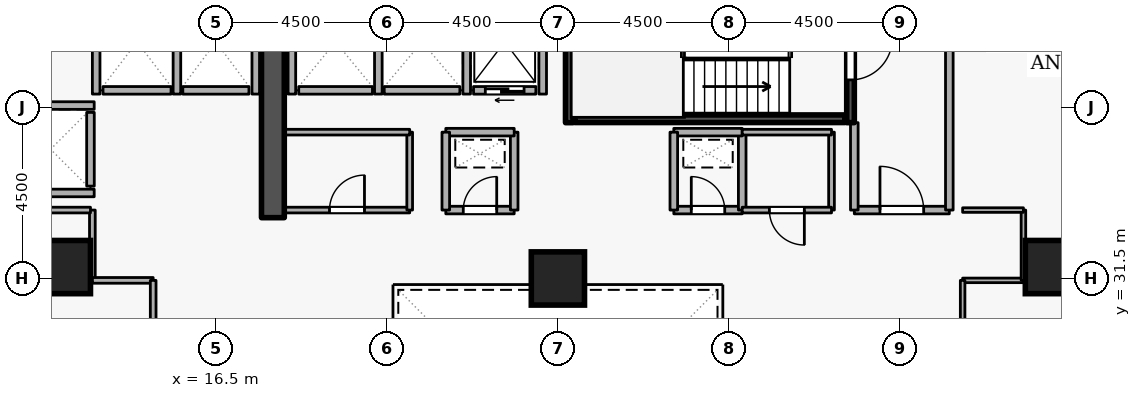
"""IFC4 building model, lengths in metres.
Left out: names, types, materials, properties, quantities, classifications, styles, units other than length and angle.
Written with IfcOpenShell. Run it as: python <this file> out.ifc"""

import sys

from ifc_helpers import new_model, si_unit, direction, frame, frame_2d, origin, origin_2d, place, context, subcontext, project, spatial, rectangle, extrude, element, fill, save


model = new_model("IFC4")
c1 = context("Model", 3, precision=1e-05, world=origin(), true_north=direction((0.0, 1.0)))
c2 = subcontext(c1, "Body", "Model", "MODEL_VIEW")
j1 = project(units=[si_unit("LENGTHUNIT", "METRE"), si_unit("PLANEANGLEUNIT", "RADIAN")], contexts=[c1])
p1 = place(None, origin())
s1 = spatial("IfcSite", under=j1, at=p1, CompositionType="ELEMENT")
p2 = place(p1, origin())
s2 = spatial("IfcBuilding", under=s1, at=p2, CompositionType="ELEMENT")
p3 = place(p2, frame((0.0, 0.0, 27.9)))
s3 = spatial("IfcBuildingStorey", under=s2, at=p3, CompositionType="ELEMENT", Elevation=27.9)
p4 = place(p3, frame((18.0, 33.1, 0.0), z_axis=(0.0, 0.0, 1.0), x_axis=(0.0, 1.0, 0.0)))
e1 = element("IfcWall", 1, at=p4, inside=s3, PredefinedType="SHEAR", context=c2, shape_type="SweptSolid", body=[
    extrude(rectangle(XDim=5.7, YDim=0.6, at=frame_2d((2.85, 0.0))), origin(), (0.0, 0.0, 1.0), 3.6),
])
for number, where, z_axis, x_axis in (
    (2, (12.5, 31.8, 0.0), (0.0, 0.0, 1.0), (1.0, 0.0, 0.0)),
    (3, (38.5, 31.8, 0.0), (0.0, 0.0, 1.0), (1.0, 0.0, 0.0)),
    (4, (25.5, 31.5, 0.0), (0.0, 0.0, 1.0), (1.0, 0.0, 0.0)),
):
    element("IfcColumn", number, at=place(p3, frame(where, z_axis=z_axis, x_axis=x_axis)), inside=s3, PredefinedType="COLUMN", context=c2, shape_type="SweptSolid", body=[
        extrude(rectangle(XDim=1.4, YDim=1.4, at=origin_2d()), origin(), (0.0, 0.0, 1.0), 3.6),
    ])
p5 = place(p3, frame((24.92, 36.45, 0.0), z_axis=(0.0, 0.0, 1.0), x_axis=(-1.0, 0.0, 0.0)))
e5 = element("IfcWall", 5, at=p5, inside=s3, PredefinedType="STANDARD", context=c2, shape_type="SweptSolid", body=[
    extrude(rectangle(XDim=1.64, YDim=0.2, at=frame_2d((0.82, 0.0))), origin(), (0.0, 0.0, 1.0), 3.34),
])
p6 = place(p5, frame((0.31, 0.0, 0.0)))
e6 = element("IfcOpeningElement", 6, at=p6, cuts=e5, PredefinedType="OPENING", context=c2, shape_type="SweptSolid", body=[
    extrude(rectangle(XDim=1.02, YDim=2.06, at=frame_2d((0.51, 1.03))), frame((0.0, 0.11, 0.0), z_axis=(0.0, -1.0, 0.0), x_axis=(1.0, 0.0, 0.0)), (0.0, 0.0, 1.0), 0.22),
])
p7 = place(p3, frame((22.92, 36.45, 0.0), z_axis=(0.0, 0.0, 1.0), x_axis=(-1.0, 0.0, 0.0)))
e7 = element("IfcWall", 7, at=p7, inside=s3, PredefinedType="STANDARD", context=c2, shape_type="SweptSolid", body=[
    extrude(rectangle(XDim=1.99, YDim=0.2, at=frame_2d((0.995, 0.0))), origin(), (0.0, 0.0, 1.0), 3.34),
])
p8 = place(p3, frame((20.62, 36.45, 0.0), z_axis=(0.0, 0.0, 1.0), x_axis=(-1.0, 0.0, 0.0)))
e8 = element("IfcWall", 8, at=p8, inside=s3, PredefinedType="STANDARD", context=c2, shape_type="SweptSolid", body=[
    extrude(rectangle(XDim=1.94, YDim=0.2, at=frame_2d((0.97, 0.0))), origin(), (0.0, 0.0, 1.0), 3.34),
])
p9 = place(p3, frame((17.37, 36.45, 0.0), z_axis=(0.0, 0.0, 1.0), x_axis=(-1.0, 0.0, 0.0)))
e9 = element("IfcWall", 9, at=p9, inside=s3, PredefinedType="STANDARD", context=c2, shape_type="SweptSolid", body=[
    extrude(rectangle(XDim=1.74, YDim=0.2, at=frame_2d((0.87, 0.0))), origin(), (0.0, 0.0, 1.0), 3.34),
])
p10 = place(p3, frame((15.32, 36.45, 0.0), z_axis=(0.0, 0.0, 1.0), x_axis=(-1.0, 0.0, 0.0)))
e10 = element("IfcWall", 10, at=p10, inside=s3, PredefinedType="STANDARD", context=c2, shape_type="SweptSolid", body=[
    extrude(rectangle(XDim=1.79, YDim=0.2, at=frame_2d((0.895, 0.0))), origin(), (0.0, 0.0, 1.0), 3.34),
])
p11 = place(p3, frame((13.2, 33.93, 0.0), z_axis=(0.0, 0.0, 1.0), x_axis=(0.0, 1.0, 0.0)))
e11 = element("IfcWall", 11, at=p11, inside=s3, PredefinedType="STANDARD", context=c2, shape_type="SweptSolid", body=[
    extrude(rectangle(XDim=1.94, YDim=0.2, at=frame_2d((0.97, 0.0))), origin(), (0.0, 0.0, 1.0), 3.34),
])
for number, where, z_axis, x_axis in (
    (12, (25.1, 36.352, 0.0), (0.0, 0.0, 1.0), (0.0, 1.0, 0.0)),
    (13, (23.1, 36.352, 0.0), (0.0, 0.0, 1.0), (0.0, 1.0, 0.0)),
    (14, (20.775, 36.352, 0.0), (0.0, 0.0, 1.0), (0.0, 1.0, 0.0)),
    (15, (18.5, 36.352, 0.0), (0.0, 0.0, 1.0), (0.0, 1.0, 0.0)),
):
    element("IfcWall", number, at=place(p3, frame(where, z_axis=z_axis, x_axis=x_axis)), inside=s3, PredefinedType="STANDARD", context=c2, shape_type="SweptSolid", body=[
        extrude(rectangle(XDim=2.436, YDim=0.2, at=frame_2d((1.218, 0.0))), origin(), (0.0, 0.0, 1.0), 3.34),
    ])
p12 = place(p3, frame((17.55, 36.352, 0.0), z_axis=(0.0, 0.0, 1.0), x_axis=(0.0, 1.0, 0.0)))
e16 = element("IfcWall", 16, at=p12, inside=s3, PredefinedType="STANDARD", context=c2, shape_type="SweptSolid", body=[
    extrude(rectangle(XDim=2.636, YDim=0.2, at=frame_2d((1.318, 0.0))), origin(), (0.0, 0.0, 1.0), 2.545),
])
for number, where, z_axis, x_axis in (
    (17, (15.475, 36.352, 0.0), (0.0, 0.0, 1.0), (0.0, 1.0, 0.0)),
    (18, (13.35, 36.352, 0.0), (0.0, 0.0, 1.0), (0.0, 1.0, 0.0)),
):
    element("IfcWall", number, at=place(p3, frame(where, z_axis=z_axis, x_axis=x_axis)), inside=s3, PredefinedType="STANDARD", context=c2, shape_type="SweptSolid", body=[
        extrude(rectangle(XDim=2.636, YDim=0.2, at=frame_2d((1.318, 0.0))), origin(), (0.0, 0.0, 1.0), 3.34),
    ])
for number, where, z_axis, x_axis in (
    (19, (11.002, 36.05, 0.0), (0.0, 0.0, 1.0), (1.0, 0.0, 0.0)),
    (20, (11.002, 33.75, 0.0), (0.0, 0.0, 1.0), (1.0, 0.0, 0.0)),
):
    element("IfcWall", number, at=place(p3, frame(where, z_axis=z_axis, x_axis=x_axis)), inside=s3, PredefinedType="STANDARD", context=c2, shape_type="SweptSolid", body=[
        extrude(rectangle(XDim=2.296, YDim=0.2, at=frame_2d((1.148, 0.0))), origin(), (0.0, 0.0, 1.0), 3.34),
    ])
p13 = place(p3, frame((33.2, 38.95, 0.0), z_axis=(0.0, 0.0, 1.0), x_axis=(0.0, -1.0, 0.0)))
e21 = element("IfcWall", 21, at=p13, inside=s3, PredefinedType="SHEAR", context=c2, shape_type="SweptSolid", body=[
    extrude(rectangle(XDim=3.35, YDim=0.2, at=frame_2d((1.675, 0.0))), origin(), (0.0, 0.0, 1.0), 3.6),
])
p14 = place(p13, frame((1.125, 0.0, 0.0)))
e22 = element("IfcOpeningElement", 22, at=p14, cuts=e21, PredefinedType="OPENING", context=c2, shape_type="SweptSolid", body=[
    extrude(rectangle(XDim=1.1, YDim=2.1, at=frame_2d((0.55, 1.05))), frame((0.0, 0.11, 0.0), z_axis=(0.0, -1.0, 0.0), x_axis=(1.0, 0.0, 0.0)), (0.0, 0.0, 1.0), 0.22),
])
p15 = place(p3, frame((25.8, 35.6, 0.0), z_axis=(0.0, 0.0, 1.0), x_axis=(0.0, 1.0, 0.0)))
e23 = element("IfcWall", 23, at=p15, inside=s3, PredefinedType="SHEAR", context=c2, shape_type="SweptSolid", body=[
    extrude(rectangle(XDim=3.35, YDim=0.2, at=frame_2d((1.675, 0.0))), origin(), (0.0, 0.0, 1.0), 3.6),
])
p16 = place(p3, frame((25.95, 35.703, 0.0), z_axis=(0.0, 0.0, 1.0), x_axis=(1.0, 0.0, 0.0)))
e24 = element("IfcWall", 24, at=p16, inside=s3, PredefinedType="SHEAR", context=c2, shape_type="SweptSolid", body=[
    extrude(rectangle(XDim=7.1, YDim=0.2, at=frame_2d((3.55, 0.0))), origin(), (0.0, 0.0, 1.0), 3.6),
])
p17 = place(p3, frame((33.3, 33.3, 0.0), z_axis=(0.0, 0.0, 1.0), x_axis=(1.0, 0.0, 0.0)))
e25 = element("IfcWall", 25, at=p17, inside=s3, PredefinedType="STANDARD", context=c2, shape_type="SweptSolid", body=[
    extrude(rectangle(XDim=2.5, YDim=0.2, at=frame_2d((1.25, 0.0))), origin(), (0.0, 0.0, 1.0), 3.34),
])
p18 = place(p17, frame((0.675, 0.0, 0.0)))
e26 = element("IfcOpeningElement", 26, at=p18, cuts=e25, PredefinedType="OPENING", context=c2, shape_type="SweptSolid", body=[
    extrude(rectangle(XDim=1.15, YDim=2.1, at=frame_2d((0.575, 1.05))), frame((0.0, 0.11, 0.0), z_axis=(0.0, -1.0, 0.0), x_axis=(1.0, 0.0, 0.0)), (0.0, 0.0, 1.0), 0.22),
])
p19 = place(p3, frame((35.8, 33.3, 0.0), z_axis=(0.0, 0.0, 1.0), x_axis=(0.0, 1.0, 0.0)))
e27 = element("IfcWall", 27, at=p19, inside=s3, PredefinedType="STANDARD", context=c2, shape_type="SweptSolid", body=[
    extrude(rectangle(XDim=5.7, YDim=0.2, at=frame_2d((2.85, 0.0))), origin(), (0.0, 0.0, 1.0), 3.34),
])
p20 = place(p3, frame((33.3, 35.6, 0.0), z_axis=(0.0, 0.0, 1.0), x_axis=(0.0, -1.0, 0.0)))
e28 = element("IfcWall", 28, at=p20, inside=s3, PredefinedType="STANDARD", context=c2, shape_type="SweptSolid", body=[
    extrude(rectangle(XDim=2.3, YDim=0.2, at=frame_2d((1.15, 0.0))), origin(), (0.0, 0.0, 1.0), 2.545),
])
p21 = place(p3, frame((22.55, 33.3, 0.0), z_axis=(0.0, 0.0, 1.0), x_axis=(1.0, 0.0, 0.0)))
e29 = element("IfcWall", 29, at=p21, inside=s3, PredefinedType="STANDARD", context=c2, shape_type="SweptSolid", body=[
    extrude(rectangle(XDim=1.8, YDim=0.2, at=frame_2d((0.9, 0.0))), origin(), (0.0, 0.0, 1.0), 3.34),
])
p22 = place(p21, frame((0.46, 0.0, 0.0)))
e30 = element("IfcOpeningElement", 30, at=p22, cuts=e29, PredefinedType="OPENING", context=c2, shape_type="SweptSolid", body=[
    extrude(rectangle(XDim=0.88, YDim=2.04, at=frame_2d((0.44, 1.02))), frame((0.0, 0.11, 0.0), z_axis=(0.0, -1.0, 0.0), x_axis=(1.0, 0.0, 0.0)), (0.0, 0.0, 1.0), 0.22),
])
p23 = place(p3, frame((24.35, 33.3, 0.0), z_axis=(0.0, 0.0, 1.0), x_axis=(0.0, 1.0, 0.0)))
e31 = element("IfcWall", 31, at=p23, inside=s3, PredefinedType="STANDARD", context=c2, shape_type="SweptSolid", body=[
    extrude(rectangle(XDim=2.05, YDim=0.2, at=frame_2d((1.025, 0.0))), origin(), (0.0, 0.0, 1.0), 3.34),
])
p24 = place(p3, frame((24.35, 35.35, 0.0), z_axis=(0.0, 0.0, 1.0), x_axis=(-1.0, 0.0, 0.0)))
e32 = element("IfcWall", 32, at=p24, inside=s3, PredefinedType="STANDARD", context=c2, shape_type="SweptSolid", body=[
    extrude(rectangle(XDim=1.8, YDim=0.2, at=frame_2d((0.9, 0.0))), origin(), (0.0, 0.0, 1.0), 3.34),
])
p25 = place(p3, frame((22.55, 35.35, 0.0), z_axis=(0.0, 0.0, 1.0), x_axis=(0.0, -1.0, 0.0)))
e33 = element("IfcWall", 33, at=p25, inside=s3, PredefinedType="STANDARD", context=c2, shape_type="SweptSolid", body=[
    extrude(rectangle(XDim=2.05, YDim=0.2, at=frame_2d((1.025, 0.0))), origin(), (0.0, 0.0, 1.0), 3.34),
])
p26 = place(p3, frame((28.55, 33.3, 0.0), z_axis=(0.0, 0.0, 1.0), x_axis=(1.0, 0.0, 0.0)))
e34 = element("IfcWall", 34, at=p26, inside=s3, PredefinedType="STANDARD", context=c2, shape_type="SweptSolid", body=[
    extrude(rectangle(XDim=1.8, YDim=0.2, at=frame_2d((0.9, 0.0))), origin(), (0.0, 0.0, 1.0), 3.34),
])
p27 = place(p26, frame((0.46, 0.0, 0.0)))
e35 = element("IfcOpeningElement", 35, at=p27, cuts=e34, PredefinedType="OPENING", context=c2, shape_type="SweptSolid", body=[
    extrude(rectangle(XDim=0.88, YDim=2.04, at=frame_2d((0.44, 1.02))), frame((0.0, 0.11, 0.0), z_axis=(0.0, -1.0, 0.0), x_axis=(1.0, 0.0, 0.0)), (0.0, 0.0, 1.0), 0.22),
])
p28 = place(p3, frame((30.35, 33.3, 0.0), z_axis=(0.0, 0.0, 1.0), x_axis=(0.0, 1.0, 0.0)))
e36 = element("IfcWall", 36, at=p28, inside=s3, PredefinedType="STANDARD", context=c2, shape_type="SweptSolid", body=[
    extrude(rectangle(XDim=2.05, YDim=0.2, at=frame_2d((1.025, 0.0))), origin(), (0.0, 0.0, 1.0), 3.34),
])
p29 = place(p3, frame((30.35, 35.35, 0.0), z_axis=(0.0, 0.0, 1.0), x_axis=(-1.0, 0.0, 0.0)))
e37 = element("IfcWall", 37, at=p29, inside=s3, PredefinedType="STANDARD", context=c2, shape_type="SweptSolid", body=[
    extrude(rectangle(XDim=1.8, YDim=0.2, at=frame_2d((0.9, 0.0))), origin(), (0.0, 0.0, 1.0), 3.34),
])
p30 = place(p3, frame((28.55, 35.35, 0.0), z_axis=(0.0, 0.0, 1.0), x_axis=(0.0, -1.0, 0.0)))
e38 = element("IfcWall", 38, at=p30, inside=s3, PredefinedType="STANDARD", context=c2, shape_type="SweptSolid", body=[
    extrude(rectangle(XDim=2.05, YDim=0.2, at=frame_2d((1.025, 0.0))), origin(), (0.0, 0.0, 1.0), 3.34),
])
p31 = place(p3, frame((18.3, 33.3, 0.0), z_axis=(0.0, 0.0, 1.0), x_axis=(1.0, 0.0, 0.0)))
e39 = element("IfcWall", 39, at=p31, inside=s3, PredefinedType="PARTITIONING", context=c2, shape_type="SweptSolid", body=[
    extrude(rectangle(XDim=3.3, YDim=0.15, at=frame_2d((1.65, 0.0))), origin(), (0.0, 0.0, 1.0), 3.34),
])
p32 = place(p31, frame((1.19, 0.0, 0.0)))
e40 = element("IfcOpeningElement", 40, at=p32, cuts=e39, PredefinedType="OPENING", context=c2, shape_type="SweptSolid", body=[
    extrude(rectangle(XDim=0.92, YDim=2.08, at=frame_2d((0.46, 1.04))), frame((0.0, 0.085, 0.0), z_axis=(0.0, -1.0, 0.0), x_axis=(1.0, 0.0, 0.0)), (0.0, 0.0, 1.0), 0.17),
])
p33 = place(p3, frame((21.6, 33.3, 0.0), z_axis=(0.0, 0.0, 1.0), x_axis=(0.0, 1.0, 0.0)))
e41 = element("IfcWall", 41, at=p33, inside=s3, PredefinedType="PARTITIONING", context=c2, shape_type="SweptSolid", body=[
    extrude(rectangle(XDim=2.05, YDim=0.15, at=frame_2d((1.025, 0.0))), origin(), (0.0, 0.0, 1.0), 3.34),
])
p34 = place(p3, frame((21.6, 35.35, 0.0), z_axis=(0.0, 0.0, 1.0), x_axis=(-1.0, 0.0, 0.0)))
e42 = element("IfcWall", 42, at=p34, inside=s3, PredefinedType="PARTITIONING", context=c2, shape_type="SweptSolid", body=[
    extrude(rectangle(XDim=3.3, YDim=0.15, at=frame_2d((1.65, 0.0))), origin(), (0.0, 0.0, 1.0), 3.34),
])
p35 = place(p3, frame((32.7, 35.35, 0.0), z_axis=(0.0, 0.0, 1.0), x_axis=(0.0, -1.0, 0.0)))
e43 = element("IfcWall", 43, at=p35, inside=s3, PredefinedType="PARTITIONING", context=c2, shape_type="SweptSolid", body=[
    extrude(rectangle(XDim=2.05, YDim=0.15, at=frame_2d((1.025, 0.0))), origin(), (0.0, 0.0, 1.0), 2.545),
])
p36 = place(p3, frame((32.7, 33.3, 0.0), z_axis=(0.0, 0.0, 1.0), x_axis=(-1.0, 0.0, 0.0)))
e44 = element("IfcWall", 44, at=p36, inside=s3, PredefinedType="PARTITIONING", context=c2, shape_type="SweptSolid", body=[
    extrude(rectangle(XDim=2.35, YDim=0.15, at=frame_2d((1.175, 0.0))), origin(), (0.0, 0.0, 1.0), 3.34),
])
p37 = place(p36, frame((0.715, 0.0, 0.0)))
e45 = element("IfcOpeningElement", 45, at=p37, cuts=e44, PredefinedType="OPENING", context=c2, shape_type="SweptSolid", body=[
    extrude(rectangle(XDim=0.92, YDim=2.08, at=frame_2d((0.46, 1.04))), frame((0.0, 0.085, 0.0), z_axis=(0.0, -1.0, 0.0), x_axis=(1.0, 0.0, 0.0)), (0.0, 0.0, 1.0), 0.17),
])
p38 = place(p3, frame((30.35, 35.35, 0.0), z_axis=(0.0, 0.0, 1.0), x_axis=(1.0, 0.0, 0.0)))
e46 = element("IfcWall", 46, at=p38, inside=s3, PredefinedType="PARTITIONING", context=c2, shape_type="SweptSolid", body=[
    extrude(rectangle(XDim=2.35, YDim=0.15, at=frame_2d((1.175, 0.0))), origin(), (0.0, 0.0, 1.0), 3.34),
])
p39 = place(p3, frame((13.25, 33.3, 0.0), z_axis=(0.0, 0.0, 1.0), x_axis=(0.0, -1.0, 0.0)))
e47 = element("IfcWall", 47, at=p39, inside=s3, PredefinedType="PARTITIONING", context=c2, shape_type="SweptSolid", body=[
    extrude(rectangle(XDim=1.85, YDim=0.15, at=frame_2d((0.925, 0.0))), origin(), (0.0, 0.0, 1.0), 3.34),
])
p40 = place(p3, frame((13.25, 31.45, 0.0), z_axis=(0.0, 0.0, 1.0), x_axis=(1.0, 0.0, 0.0)))
e48 = element("IfcWall", 48, at=p40, inside=s3, PredefinedType="PARTITIONING", context=c2, shape_type="SweptSolid", body=[
    extrude(rectangle(XDim=1.6, YDim=0.15, at=frame_2d((0.8, 0.0))), origin(), (0.0, 0.0, 1.0), 3.34),
])
p41 = place(p3, frame((14.85, 31.45, 0.0), z_axis=(0.0, 0.0, 1.0), x_axis=(0.0, -1.0, 0.0)))
e49 = element("IfcWall", 49, at=p41, inside=s3, PredefinedType="PARTITIONING", context=c2, shape_type="SweptSolid", body=[
    extrude(rectangle(XDim=4.45, YDim=0.15, at=frame_2d((2.225, 0.0))), origin(), (0.0, 0.0, 1.0), 3.34),
])
p42 = place(p41, frame((1.575, 0.0, 0.0)))
e50 = element("IfcOpeningElement", 50, at=p42, cuts=e49, PredefinedType="OPENING", context=c2, shape_type="SweptSolid", body=[
    extrude(rectangle(XDim=1.3, YDim=2.12, at=frame_2d((0.65, 1.06))), frame((0.0, 0.085, 0.0), z_axis=(0.0, -1.0, 0.0), x_axis=(1.0, 0.0, 0.0)), (0.0, 0.0, 1.0), 0.17),
])
p43 = place(p3, frame((10.9, 33.3, 0.0), z_axis=(0.0, 0.0, 1.0), x_axis=(1.0, 0.0, 0.0)))
e51 = element("IfcWall", 51, at=p43, inside=s3, PredefinedType="PARTITIONING", context=c2, shape_type="SweptSolid", body=[
    extrude(rectangle(XDim=2.3, YDim=0.15, at=frame_2d((1.15, 0.0))), origin(), (0.0, 0.0, 1.0), 3.34),
])
p44 = place(p3, frame((36.15, 31.45, 0.0), z_axis=(0.0, 0.0, 1.0), x_axis=(1.0, 0.0, 0.0)))
e52 = element("IfcWall", 52, at=p44, inside=s3, PredefinedType="PARTITIONING", context=c2, shape_type="SweptSolid", body=[
    extrude(rectangle(XDim=1.6, YDim=0.12, at=frame_2d((0.8, 0.0))), origin(), (0.0, 0.0, 1.0), 3.34),
])
p45 = place(p3, frame((37.75, 31.45, 0.0), z_axis=(0.0, 0.0, 1.0), x_axis=(0.0, 1.0, 0.0)))
e53 = element("IfcWall", 53, at=p45, inside=s3, PredefinedType="PARTITIONING", context=c2, shape_type="SweptSolid", body=[
    extrude(rectangle(XDim=1.85, YDim=0.12, at=frame_2d((0.925, 0.0))), origin(), (0.0, 0.0, 1.0), 3.34),
])
p46 = place(p3, frame((37.75, 33.3, 0.0), z_axis=(0.0, 0.0, 1.0), x_axis=(-1.0, 0.0, 0.0)))
e54 = element("IfcWall", 54, at=p46, inside=s3, PredefinedType="PARTITIONING", context=c2, shape_type="SweptSolid", body=[
    extrude(rectangle(XDim=1.6, YDim=0.12, at=frame_2d((0.8, 0.0))), origin(), (0.0, 0.0, 1.0), 3.34),
])
p47 = place(p3, frame((36.15, 27.0, 0.0), z_axis=(0.0, 0.0, 1.0), x_axis=(0.0, 1.0, 0.0)))
e55 = element("IfcWall", 55, at=p47, inside=s3, PredefinedType="PARTITIONING", context=c2, shape_type="SweptSolid", body=[
    extrude(rectangle(XDim=4.45, YDim=0.12, at=frame_2d((2.225, 0.0))), origin(), (0.0, 0.0, 1.0), 3.34),
])
p48 = place(p47, frame((1.7, 0.0, 0.0)))
e56 = element("IfcOpeningElement", 56, at=p48, cuts=e55, PredefinedType="OPENING", context=c2, shape_type="SweptSolid", body=[
    extrude(rectangle(XDim=1.05, YDim=2.1, at=frame_2d((0.525, 1.05))), frame((0.0, 0.07, 0.0), z_axis=(0.0, -1.0, 0.0), x_axis=(1.0, 0.0, 0.0)), (0.0, 0.0, 1.0), 0.14),
])
p49 = place(p6, origin())
e57 = element("IfcDoor", 57, at=p49, inside=s3, OperationType="SLIDING_TO_LEFT", PredefinedType="DOOR", context=c2, shape_type="SweptSolid", body=[
    extrude(rectangle(XDim=1.02, YDim=2.06, at=frame_2d((0.51, 1.03))), frame((0.0, 0.025, 0.0), z_axis=(0.0, -1.0, 0.0), x_axis=(1.0, 0.0, 0.0)), (0.0, 0.0, 1.0), 0.05),
])
fill(e6, e57)
p50 = place(p14, origin())
e58 = element("IfcDoor", 58, at=p50, inside=s3, OperationType="SINGLE_SWING_LEFT", PredefinedType="DOOR", context=c2, shape_type="SweptSolid", body=[
    extrude(rectangle(XDim=1.1, YDim=2.1, at=frame_2d((0.55, 1.05))), frame((0.0, 0.025, 0.0), z_axis=(0.0, -1.0, 0.0), x_axis=(1.0, 0.0, 0.0)), (0.0, 0.0, 1.0), 0.05),
])
fill(e22, e58)
p51 = place(p18, origin())
e59 = element("IfcDoor", 59, at=p51, inside=s3, OperationType="SINGLE_SWING_LEFT", PredefinedType="DOOR", context=c2, shape_type="SweptSolid", body=[
    extrude(rectangle(XDim=1.15, YDim=2.1, at=frame_2d((0.575, 1.05))), frame((0.0, 0.025, 0.0), z_axis=(0.0, -1.0, 0.0), x_axis=(1.0, 0.0, 0.0)), (0.0, 0.0, 1.0), 0.05),
])
fill(e26, e59)
p52 = place(p22, origin())
e60 = element("IfcDoor", 60, at=p52, inside=s3, OperationType="SINGLE_SWING_RIGHT", PredefinedType="DOOR", context=c2, shape_type="SweptSolid", body=[
    extrude(rectangle(XDim=0.88, YDim=2.04, at=frame_2d((0.44, 1.02))), frame((0.0, 0.025, 0.0), z_axis=(0.0, -1.0, 0.0), x_axis=(1.0, 0.0, 0.0)), (0.0, 0.0, 1.0), 0.05),
])
fill(e30, e60)
p53 = place(p27, origin())
e61 = element("IfcDoor", 61, at=p53, inside=s3, OperationType="SINGLE_SWING_LEFT", PredefinedType="DOOR", context=c2, shape_type="SweptSolid", body=[
    extrude(rectangle(XDim=0.88, YDim=2.04, at=frame_2d((0.44, 1.02))), frame((0.0, 0.025, 0.0), z_axis=(0.0, -1.0, 0.0), x_axis=(1.0, 0.0, 0.0)), (0.0, 0.0, 1.0), 0.05),
])
fill(e35, e61)
p54 = place(p32, origin())
e62 = element("IfcDoor", 62, at=p54, inside=s3, OperationType="SINGLE_SWING_RIGHT", PredefinedType="DOOR", context=c2, shape_type="SweptSolid", body=[
    extrude(rectangle(XDim=0.92, YDim=2.08, at=frame_2d((0.46, 1.04))), frame((0.0, 0.025, 0.0), z_axis=(0.0, -1.0, 0.0), x_axis=(1.0, 0.0, 0.0)), (0.0, 0.0, 1.0), 0.05),
])
fill(e40, e62)
p55 = place(p37, origin())
e63 = element("IfcDoor", 63, at=p55, inside=s3, OperationType="SINGLE_SWING_LEFT", PredefinedType="DOOR", context=c2, shape_type="SweptSolid", body=[
    extrude(rectangle(XDim=0.92, YDim=2.08, at=frame_2d((0.46, 1.04))), frame((0.0, 0.025, 0.0), z_axis=(0.0, -1.0, 0.0), x_axis=(1.0, 0.0, 0.0)), (0.0, 0.0, 1.0), 0.05),
])
fill(e45, e63)
save(model, sys.argv[1])
